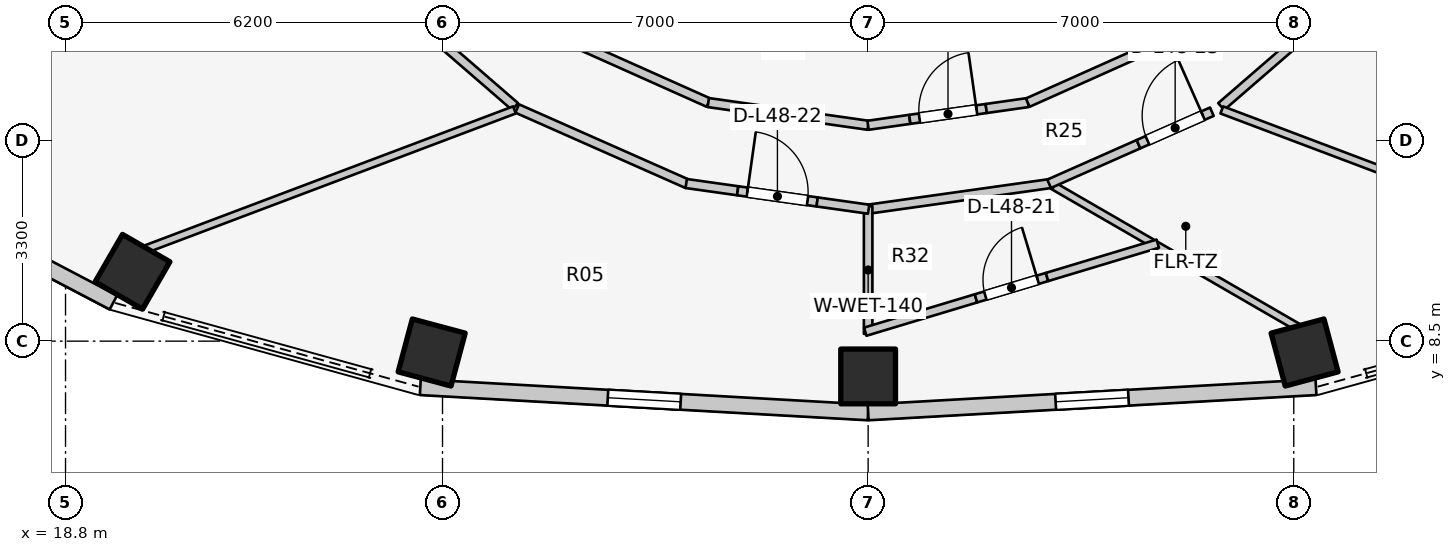
"""IFC4 building model, lengths in metres.
Left out: names, types, materials, properties, quantities, classifications, styles, units other than length and angle.
Written with IfcOpenShell. Run it as: python <this file> out.ifc"""

import sys

from ifc_helpers import new_model, si_unit, direction, frame, frame_2d, origin, origin_2d, place, context, subcontext, project, spatial, rectangle, extrude, element, fill, save


model = new_model("IFC4")
c1 = context("Model", 3, precision=1e-05, world=origin(), true_north=direction((0.0, 1.0)))
c2 = subcontext(c1, "Body", "Model", "MODEL_VIEW")
j1 = project(units=[si_unit("LENGTHUNIT", "METRE"), si_unit("PLANEANGLEUNIT", "RADIAN")], contexts=[c1])
p1 = place(None, origin())
s1 = spatial("IfcSite", under=j1, at=p1, CompositionType="ELEMENT")
p2 = place(p1, origin())
s2 = spatial("IfcBuilding", under=s1, at=p2, CompositionType="ELEMENT")
p3 = place(p2, frame((0.0, 0.0, 159.1)))
s3 = spatial("IfcBuildingStorey", under=s2, at=p3, CompositionType="ELEMENT", Elevation=159.1)
for number, where, z_axis, x_axis in (
    (1, (19.902, 9.641, 0.0), (0.0, 0.0, 1.0), (-0.5, -0.866, 0.0)),
    (2, (24.822, 8.313, 0.0), (0.0, 0.0, 1.0), (-0.259, -0.966, 0.0)),
    (3, (32.0, 7.92, 0.0), (0.0, 0.0, 1.0), (0.0, -1.0, 0.0)),
    (4, (39.178, 8.313, 0.0), (0.0, 0.0, 1.0), (0.259, -0.966, 0.0)),
):
    element("IfcColumn", number, at=place(p3, frame(where, z_axis=z_axis, x_axis=x_axis)), inside=s3, PredefinedType="COLUMN", context=c2, shape_type="SweptSolid", body=[
        extrude(rectangle(XDim=0.9, YDim=0.9, at=origin_2d()), origin(), (0.0, 0.0, 1.0), 3.1),
    ])
p4 = place(p3, frame((15.731, 11.158, 0.0), z_axis=(0.0, 0.0, 1.0), x_axis=(0.885660265226, -0.464333818065, 0.0)))
e5 = element("IfcWall", 5, at=p4, inside=s3, PredefinedType="STANDARD", context=c2, shape_type="SweptSolid", body=[
    extrude(rectangle(XDim=4.354, YDim=0.26, at=frame_2d((2.177, 0.0))), origin(), (0.0, 0.0, 1.0), 1.22),
])
p5 = place(p3, frame((24.635, 7.743, 0.0), z_axis=(0.0, 0.0, 1.0), x_axis=(0.998417906562, -0.056228852534, 0.0)))
e6 = element("IfcWall", 6, at=p5, inside=s3, PredefinedType="STANDARD", context=c2, shape_type="SweptSolid", body=[
    extrude(rectangle(XDim=7.377, YDim=0.26, at=frame_2d((3.688, 0.0))), origin(), (0.0, 0.0, 1.0), 1.22),
])
p6 = place(p5, frame((3.088, 0.0, 0.15)))
e7 = element("IfcOpeningElement", 7, at=p6, cuts=e6, PredefinedType="OPENING", context=c2, shape_type="SweptSolid", body=[
    extrude(rectangle(XDim=1.2, YDim=0.9, at=frame_2d((0.6, 0.45))), frame((0.0, 0.14, 0.0), z_axis=(0.0, -1.0, 0.0), x_axis=(1.0, 0.0, 0.0)), (0.0, 0.0, 1.0), 0.28),
])
p7 = place(p3, frame((32.0, 7.329, 0.0), z_axis=(0.0, 0.0, 1.0), x_axis=(0.998417906562, 0.056228852534, 0.0)))
e8 = element("IfcWall", 8, at=p7, inside=s3, PredefinedType="STANDARD", context=c2, shape_type="SweptSolid", body=[
    extrude(rectangle(XDim=7.377, YDim=0.26, at=frame_2d((3.688, 0.0))), origin(), (0.0, 0.0, 1.0), 1.22),
])
p8 = place(p7, frame((3.088, 0.0, 0.15)))
e9 = element("IfcOpeningElement", 9, at=p8, cuts=e8, PredefinedType="OPENING", context=c2, shape_type="SweptSolid", body=[
    extrude(rectangle(XDim=1.2, YDim=0.9, at=frame_2d((0.6, 0.45))), frame((0.0, 0.14, 0.0), z_axis=(0.0, -1.0, 0.0), x_axis=(1.0, 0.0, 0.0)), (0.0, 0.0, 1.0), 0.28),
])
for number, where, z_axis, x_axis in (
    (10, (26.193, 12.358, 0.0), (0.0, 0.0, 1.0), (-0.756, 0.655, 0.0)),
    (11, (37.807, 12.358, 0.0), (0.0, 0.0, 1.0), (0.756, 0.655, 0.0)),
):
    element("IfcWall", number, at=place(p3, frame(where, z_axis=z_axis, x_axis=x_axis)), inside=s3, PredefinedType="PARTITIONING", context=c2, shape_type="SweptSolid", body=[
        extrude(rectangle(XDim=2.111, YDim=0.15, at=frame_2d((1.055, 0.0))), origin(), (0.0, 0.0, 1.0), 2.019),
    ])
p9 = place(p3, frame((26.919, 13.521, 0.0), z_axis=(0.0, 0.0, 1.0), x_axis=(0.912888568324, -0.408208845842, 0.0)))
e12 = element("IfcWall", 12, at=p9, inside=s3, PredefinedType="PARTITIONING", context=c2, shape_type="SweptSolid", body=[
    extrude(rectangle(XDim=2.69, YDim=0.15, at=frame_2d((1.345, 0.0))), origin(), (0.0, 0.0, 1.0), 2.019),
])
p10 = place(p3, frame((29.371, 12.424, 0.0), z_axis=(0.0, 0.0, 1.0), x_axis=(0.990066775667, -0.1405979364, 0.0)))
e13 = element("IfcWall", 13, at=p10, inside=s3, PredefinedType="PARTITIONING", context=c2, shape_type="SweptSolid", body=[
    extrude(rectangle(XDim=2.657, YDim=0.15, at=frame_2d((1.328, 0.0))), origin(), (0.0, 0.0, 1.0), 2.019),
])
p11 = place(p3, frame((31.998, 12.05, 0.0), z_axis=(0.0, 0.0, 1.0), x_axis=(0.990082845611, 0.140484728093, 0.0)))
e14 = element("IfcWall", 14, at=p11, inside=s3, PredefinedType="PARTITIONING", context=c2, shape_type="SweptSolid", body=[
    extrude(rectangle(XDim=0.693, YDim=0.15, at=frame_2d((0.347, 0.0))), origin(), (0.0, 0.0, 1.0), 2.019),
])
p12 = place(p3, frame((32.685, 12.147, 0.0), z_axis=(0.0, 0.0, 1.0), x_axis=(0.990049212475, 0.140721557967, 0.0)))
e15 = element("IfcWall", 15, at=p12, inside=s3, PredefinedType="PARTITIONING", context=c2, shape_type="SweptSolid", body=[
    extrude(rectangle(XDim=1.27, YDim=0.15, at=frame_2d((0.635, 0.0))), origin(), (0.0, 0.0, 1.0), 2.575),
])
p13 = place(p12, frame((0.16, 0.0, 0.0)))
e16 = element("IfcOpeningElement", 16, at=p13, cuts=e15, PredefinedType="OPENING", context=c2, shape_type="SweptSolid", body=[
    extrude(rectangle(XDim=0.95, YDim=2.1, at=frame_2d((0.475, 1.05))), frame((0.0, 0.085, 0.0), z_axis=(0.0, -1.0, 0.0), x_axis=(1.0, 0.0, 0.0)), (0.0, 0.0, 1.0), 0.17),
])
p14 = place(p3, frame((33.942, 12.326, 0.0), z_axis=(0.0, 0.0, 1.0), x_axis=(0.990082845611, 0.140484728093, 0.0)))
e17 = element("IfcWall", 17, at=p14, inside=s3, PredefinedType="PARTITIONING", context=c2, shape_type="SweptSolid", body=[
    extrude(rectangle(XDim=0.693, YDim=0.15, at=frame_2d((0.347, 0.0))), origin(), (0.0, 0.0, 1.0), 2.575),
])
p15 = place(p3, frame((34.625, 12.423, 0.0), z_axis=(0.0, 0.0, 1.0), x_axis=(0.912888568324, 0.408208845842, 0.0)))
e18 = element("IfcWall", 18, at=p15, inside=s3, PredefinedType="PARTITIONING", context=c2, shape_type="SweptSolid", body=[
    extrude(rectangle(XDim=2.69, YDim=0.15, at=frame_2d((1.345, 0.0))), origin(), (0.0, 0.0, 1.0), 2.019),
])
p16 = place(p3, frame((26.184, 12.302, 0.0), z_axis=(0.0, 0.0, 1.0), x_axis=(-0.935601484289, -0.353057874288, 0.0)))
e19 = element("IfcWall", 19, at=p16, inside=s3, PredefinedType="PARTITIONING", context=c2, shape_type="SweptSolid", body=[
    extrude(rectangle(XDim=6.484, YDim=0.125, at=frame_2d((3.242, 0.0))), origin(), (0.0, 0.0, 1.0), 1.22),
])
p17 = place(p3, frame((35.032, 11.062, 0.0), z_axis=(0.0, 0.0, 1.0), x_axis=(0.865627016774, -0.500689392568, 0.0)))
e20 = element("IfcWall", 20, at=p17, inside=s3, PredefinedType="PARTITIONING", context=c2, shape_type="SweptSolid", body=[
    extrude(rectangle(XDim=4.662, YDim=0.125, at=frame_2d((2.331, 0.0))), origin(), (0.0, 0.0, 1.0), 1.22),
])
p18 = place(p3, frame((37.816, 12.302, 0.0), z_axis=(0.0, 0.0, 1.0), x_axis=(0.935601484289, -0.353057874288, 0.0)))
e21 = element("IfcWall", 21, at=p18, inside=s3, PredefinedType="PARTITIONING", context=c2, shape_type="SweptSolid", body=[
    extrude(rectangle(XDim=6.484, YDim=0.125, at=frame_2d((3.242, 0.0))), origin(), (0.0, 0.0, 1.0), 1.22),
])
p19 = place(p3, frame((31.95, 10.663, 0.0), z_axis=(0.0, 0.0, 1.0), x_axis=(0.990234434447, 0.139412211929, 0.0)))
e22 = element("IfcWall", 22, at=p19, inside=s3, PredefinedType="PARTITIONING", context=c2, shape_type="SweptSolid", body=[
    extrude(rectangle(XDim=3.114, YDim=0.15, at=frame_2d((1.557, 0.0))), origin(), (0.0, 0.0, 1.0), 2.019),
])
p20 = place(p3, frame((32.0, 10.72, 0.0), z_axis=(0.0, 0.0, 1.0), x_axis=(0.0, -1.0, 0.0)))
e23 = element("IfcWall", 23, at=p20, inside=s3, PredefinedType="PLUMBINGWALL", context=c2, shape_type="SweptSolid", body=[
    extrude(rectangle(XDim=2.1, YDim=0.14, at=frame_2d((1.05, 0.0))), origin(), (0.0, 0.0, 1.0), 2.019),
])
p21 = place(p3, frame((31.952, 8.656, 0.0), z_axis=(0.0, 0.0, 1.0), x_axis=(0.957589285646, 0.288136703696, 0.0)))
e24 = element("IfcWall", 24, at=p21, inside=s3, PredefinedType="PLUMBINGWALL", context=c2, shape_type="SweptSolid", body=[
    extrude(rectangle(XDim=1.902, YDim=0.14, at=frame_2d((0.951, 0.0))), origin(), (0.0, 0.0, 1.0), 2.019),
])
p22 = place(p3, frame((33.774, 9.204, 0.0), z_axis=(0.0, 0.0, 1.0), x_axis=(0.957578072853, 0.288173965498, 0.0)))
e25 = element("IfcWall", 25, at=p22, inside=s3, PredefinedType="PLUMBINGWALL", context=c2, shape_type="SweptSolid", body=[
    extrude(rectangle(XDim=1.22, YDim=0.14, at=frame_2d((0.61, 0.0))), origin(), (0.0, 0.0, 1.0), 2.575),
])
p23 = place(p22, frame((0.16, 0.0, 0.0)))
e26 = element("IfcOpeningElement", 26, at=p23, cuts=e25, PredefinedType="OPENING", context=c2, shape_type="SweptSolid", body=[
    extrude(rectangle(XDim=0.9, YDim=2.1, at=frame_2d((0.45, 1.05))), frame((0.0, 0.08, 0.0), z_axis=(0.0, -1.0, 0.0), x_axis=(1.0, 0.0, 0.0)), (0.0, 0.0, 1.0), 0.16),
])
p24 = place(p3, frame((34.942, 9.555, 0.0), z_axis=(0.0, 0.0, 1.0), x_axis=(0.957624692509, 0.288019006834, 0.0)))
e27 = element("IfcWall", 27, at=p24, inside=s3, PredefinedType="PLUMBINGWALL", context=c2, shape_type="SweptSolid", body=[
    extrude(rectangle(XDim=1.902, YDim=0.14, at=frame_2d((0.951, 0.0))), origin(), (0.0, 0.0, 1.0), 2.575),
])
p25 = place(p3, frame((26.228, 12.326, 0.0), z_axis=(0.0, 0.0, 1.0), x_axis=(0.914324470734, -0.404982422108, 0.0)))
e28 = element("IfcWall", 28, at=p25, inside=s3, PredefinedType="PARTITIONING", context=c2, shape_type="SweptSolid", body=[
    extrude(rectangle(XDim=3.058, YDim=0.15, at=frame_2d((1.529, 0.0))), origin(), (0.0, 0.0, 1.0), 2.019),
])
p26 = place(p3, frame((29.008, 11.092, 0.0), z_axis=(0.0, 0.0, 1.0), x_axis=(0.990238723834, -0.139381741342, 0.0)))
e29 = element("IfcWall", 29, at=p26, inside=s3, PredefinedType="PARTITIONING", context=c2, shape_type="SweptSolid", body=[
    extrude(rectangle(XDim=0.855, YDim=0.15, at=frame_2d((0.427, 0.0))), origin(), (0.0, 0.0, 1.0), 2.575),
])
p27 = place(p3, frame((29.854, 10.973, 0.0), z_axis=(0.0, 0.0, 1.0), x_axis=(0.990254187593, -0.139271834751, 0.0)))
e30 = element("IfcWall", 30, at=p27, inside=s3, PredefinedType="PARTITIONING", context=c2, shape_type="SweptSolid", body=[
    extrude(rectangle(XDim=1.32, YDim=0.15, at=frame_2d((0.66, 0.0))), origin(), (0.0, 0.0, 1.0), 2.575),
])
p28 = place(p27, frame((0.16, 0.0, 0.0)))
e31 = element("IfcOpeningElement", 31, at=p28, cuts=e30, PredefinedType="OPENING", context=c2, shape_type="SweptSolid", body=[
    extrude(rectangle(XDim=1.0, YDim=2.1, at=frame_2d((0.5, 1.05))), frame((0.0, 0.085, 0.0), z_axis=(0.0, -1.0, 0.0), x_axis=(1.0, 0.0, 0.0)), (0.0, 0.0, 1.0), 0.17),
])
p29 = place(p3, frame((31.162, 10.789, 0.0), z_axis=(0.0, 0.0, 1.0), x_axis=(0.990199264419, -0.139661794145, 0.0)))
e32 = element("IfcWall", 32, at=p29, inside=s3, PredefinedType="PARTITIONING", context=c2, shape_type="SweptSolid", body=[
    extrude(rectangle(XDim=0.855, YDim=0.15, at=frame_2d((0.427, 0.0))), origin(), (0.0, 0.0, 1.0), 2.019),
])
p30 = place(p3, frame((34.976, 11.088, 0.0), z_axis=(0.0, 0.0, 1.0), x_axis=(0.914324480558, 0.404982399928, 0.0)))
e33 = element("IfcWall", 33, at=p30, inside=s3, PredefinedType="PARTITIONING", context=c2, shape_type="SweptSolid", body=[
    extrude(rectangle(XDim=1.607, YDim=0.15, at=frame_2d((0.804, 0.0))), origin(), (0.0, 0.0, 1.0), 2.019),
])
p31 = place(p3, frame((36.446, 11.739, 0.0), z_axis=(0.0, 0.0, 1.0), x_axis=(0.914314172667, 0.405005671145, 0.0)))
e34 = element("IfcWall", 34, at=p31, inside=s3, PredefinedType="PARTITIONING", context=c2, shape_type="SweptSolid", body=[
    extrude(rectangle(XDim=1.32, YDim=0.15, at=frame_2d((0.66, 0.0))), origin(), (0.0, 0.0, 1.0), 2.16),
])
p32 = place(p31, frame((0.16, 0.0, 0.0)))
e35 = element("IfcOpeningElement", 35, at=p32, cuts=e34, PredefinedType="OPENING", context=c2, shape_type="SweptSolid", body=[
    extrude(rectangle(XDim=1.0, YDim=2.1, at=frame_2d((0.5, 1.05))), frame((0.0, 0.085, 0.0), z_axis=(0.0, -1.0, 0.0), x_axis=(1.0, 0.0, 0.0)), (0.0, 0.0, 1.0), 0.17),
])
p33 = place(p6, origin())
e36 = element("IfcWindow", 36, at=p33, inside=s3, PartitioningType="SINGLE_PANEL", PredefinedType="WINDOW", context=c2, shape_type="SweptSolid", body=[
    extrude(rectangle(XDim=1.2, YDim=0.9, at=frame_2d((0.6, 0.45))), frame((0.0, 0.03, 0.0), z_axis=(0.0, -1.0, 0.0), x_axis=(1.0, 0.0, 0.0)), (0.0, 0.0, 1.0), 0.06),
])
fill(e7, e36)
p34 = place(p8, origin())
e37 = element("IfcWindow", 37, at=p34, inside=s3, PartitioningType="SINGLE_PANEL", PredefinedType="WINDOW", context=c2, shape_type="SweptSolid", body=[
    extrude(rectangle(XDim=1.2, YDim=0.9, at=frame_2d((0.6, 0.45))), frame((0.0, 0.03, 0.0), z_axis=(0.0, -1.0, 0.0), x_axis=(1.0, 0.0, 0.0)), (0.0, 0.0, 1.0), 0.06),
])
fill(e9, e37)
p35 = place(p13, origin())
e38 = element("IfcDoor", 38, at=p35, inside=s3, OperationType="SINGLE_SWING_RIGHT", PredefinedType="DOOR", context=c2, shape_type="SweptSolid", body=[
    extrude(rectangle(XDim=0.95, YDim=2.1, at=frame_2d((0.475, 1.05))), frame((0.0, 0.025, 0.0), z_axis=(0.0, -1.0, 0.0), x_axis=(1.0, 0.0, 0.0)), (0.0, 0.0, 1.0), 0.05),
])
fill(e16, e38)
p36 = place(p23, origin())
e39 = element("IfcDoor", 39, at=p36, inside=s3, OperationType="SINGLE_SWING_RIGHT", PredefinedType="DOOR", context=c2, shape_type="SweptSolid", body=[
    extrude(rectangle(XDim=0.9, YDim=2.1, at=frame_2d((0.45, 1.05))), frame((0.0, 0.025, 0.0), z_axis=(0.0, -1.0, 0.0), x_axis=(1.0, 0.0, 0.0)), (0.0, 0.0, 1.0), 0.05),
])
fill(e26, e39)
p37 = place(p28, origin())
e40 = element("IfcDoor", 40, at=p37, inside=s3, OperationType="SINGLE_SWING_LEFT", PredefinedType="DOOR", context=c2, shape_type="SweptSolid", body=[
    extrude(rectangle(XDim=1.0, YDim=2.1, at=frame_2d((0.5, 1.05))), frame((0.0, 0.025, 0.0), z_axis=(0.0, -1.0, 0.0), x_axis=(1.0, 0.0, 0.0)), (0.0, 0.0, 1.0), 0.05),
])
fill(e31, e40)
p38 = place(p32, origin())
e41 = element("IfcDoor", 41, at=p38, inside=s3, OperationType="SINGLE_SWING_RIGHT", PredefinedType="DOOR", context=c2, shape_type="SweptSolid", body=[
    extrude(rectangle(XDim=1.0, YDim=2.1, at=frame_2d((0.5, 1.05))), frame((0.0, 0.025, 0.0), z_axis=(0.0, -1.0, 0.0), x_axis=(1.0, 0.0, 0.0)), (0.0, 0.0, 1.0), 0.05),
])
fill(e35, e41)
save(model, sys.argv[1])
